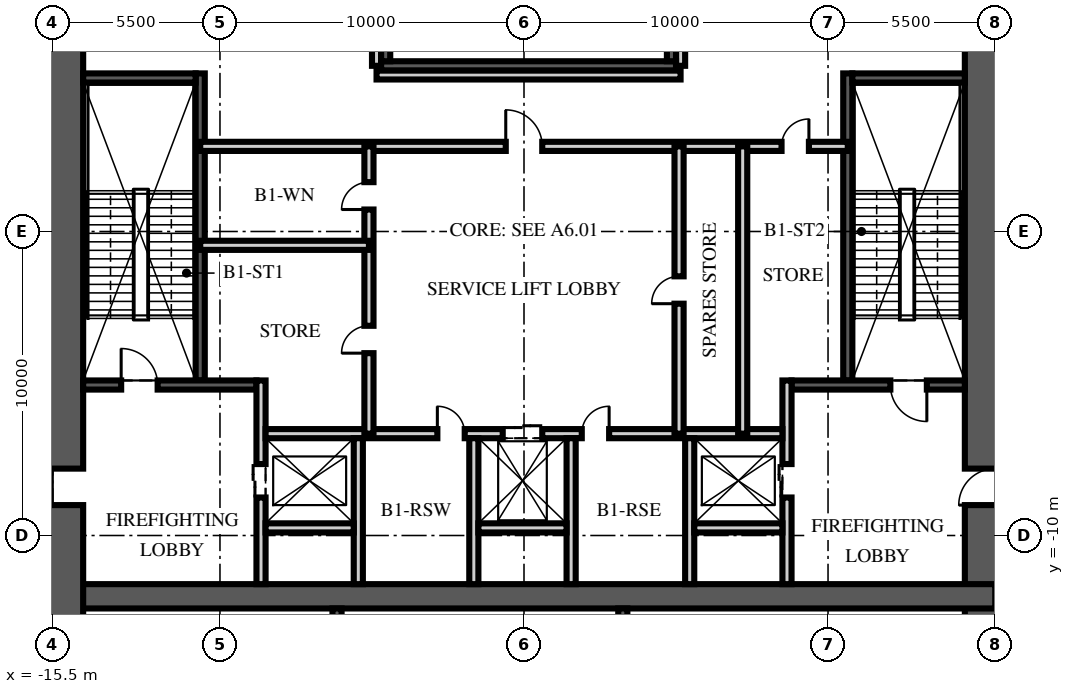
"""IFC4 building model, lengths in metres.
Left out: names, types, materials, properties, quantities, classifications, styles, units other than length and angle.
Written with IfcOpenShell. Run it as: python <this file> out.ifc"""

import sys

from ifc_helpers import new_model, si_unit, direction, frame, frame_2d, origin, place, context, subcontext, project, spatial, rectangle, extrude, element, fill, save


model = new_model("IFC4")
c1 = context("Model", 3, precision=1e-05, world=origin(), true_north=direction((0.0, 1.0)))
c2 = subcontext(c1, "Body", "Model", "MODEL_VIEW")
j1 = project(units=[si_unit("LENGTHUNIT", "METRE"), si_unit("PLANEANGLEUNIT", "RADIAN")], contexts=[c1])
p1 = place(None, origin())
s1 = spatial("IfcSite", under=j1, at=p1, CompositionType="ELEMENT")
p2 = place(p1, origin())
s2 = spatial("IfcBuilding", under=s1, at=p2, CompositionType="ELEMENT")
p3 = place(p2, frame((0.0, 0.0, -5.4)))
s3 = spatial("IfcBuildingStorey", under=s2, at=p3, CompositionType="ELEMENT", Elevation=-5.4)
p4 = place(p3, frame((15.5, -15.5, -0.3), z_axis=(0.0, 0.0, 1.0), x_axis=(0.0, 1.0, 0.0)))
e1 = element("IfcWall", 1, at=p4, inside=s3, PredefinedType="SHEAR", context=c2, shape_type="SweptSolid", body=[
    extrude(rectangle(XDim=31.0, YDim=2.0, at=frame_2d((15.5, 0.0))), origin(), (0.0, 0.0, 1.0), 5.4),
])
p5 = place(p4, frame((6.5, 0.0, 0.3)))
e2 = element("IfcOpeningElement", 2, at=p5, cuts=e1, PredefinedType="OPENING", context=c2, shape_type="SweptSolid", body=[
    extrude(rectangle(XDim=1.2, YDim=2.1, at=frame_2d((0.6, 1.05))), frame((0.0, 1.01, 0.0), z_axis=(0.0, -1.0, 0.0), x_axis=(1.0, 0.0, 0.0)), (0.0, 0.0, 1.0), 2.02),
])
p6 = place(p4, frame((23.0, 0.0, 0.3)))
e3 = element("IfcOpeningElement", 3, at=p6, cuts=e1, PredefinedType="OPENING", context=c2, shape_type="SweptSolid", body=[
    extrude(rectangle(XDim=1.8, YDim=2.1, at=frame_2d((0.9, 1.05))), frame((0.0, 1.01, 0.0), z_axis=(0.0, -1.0, 0.0), x_axis=(1.0, 0.0, 0.0)), (0.0, 0.0, 1.0), 2.02),
])
p7 = place(p3, frame((-15.5, -12.0, -0.3), z_axis=(0.0, 0.0, 1.0), x_axis=(1.0, 0.0, 0.0)))
e4 = element("IfcWall", 4, at=p7, inside=s3, PredefinedType="SHEAR", context=c2, shape_type="SweptSolid", body=[
    extrude(rectangle(XDim=31.0, YDim=0.8, at=frame_2d((15.5, 0.0))), origin(), (0.0, 0.0, 1.0), 5.4),
])
p8 = place(p3, frame((-15.5, -15.5, -0.3), z_axis=(0.0, 0.0, 1.0), x_axis=(0.0, 1.0, 0.0)))
e5 = element("IfcWall", 5, at=p8, inside=s3, PredefinedType="SHEAR", context=c2, shape_type="SweptSolid", body=[
    extrude(rectangle(XDim=31.0, YDim=2.0, at=frame_2d((15.5, 0.0))), origin(), (0.0, 0.0, 1.0), 5.4),
])
p9 = place(p8, frame((6.5, 0.0, 0.3)))
e6 = element("IfcOpeningElement", 6, at=p9, cuts=e5, PredefinedType="OPENING", context=c2, shape_type="SweptSolid", body=[
    extrude(rectangle(XDim=1.2, YDim=2.1, at=frame_2d((0.6, 1.05))), frame((0.0, 1.01, 0.0), z_axis=(0.0, -1.0, 0.0), x_axis=(1.0, 0.0, 0.0)), (0.0, 0.0, 1.0), 2.02),
])
p10 = place(p8, frame((23.0, 0.0, 0.3)))
e7 = element("IfcOpeningElement", 7, at=p10, cuts=e5, PredefinedType="OPENING", context=c2, shape_type="SweptSolid", body=[
    extrude(rectangle(XDim=1.8, YDim=2.1, at=frame_2d((0.9, 1.05))), frame((0.0, 1.01, 0.0), z_axis=(0.0, -1.0, 0.0), x_axis=(1.0, 0.0, 0.0)), (0.0, 0.0, 1.0), 2.02),
])
p11 = place(p3, frame((-10.65, -4.9, 0.0), z_axis=(0.0, 0.0, 1.0), x_axis=(0.0, 1.0, 0.0)))
e8 = element("IfcWall", 8, at=p11, inside=s3, PredefinedType="SOLIDWALL", context=c2, shape_type="SweptSolid", body=[
    extrude(rectangle(XDim=10.1, YDim=0.3, at=frame_2d((5.05, 0.0))), origin(), (0.0, 0.0, 1.0), 5.1),
])
p12 = place(p3, frame((-14.5, -5.05, 0.0), z_axis=(0.0, 0.0, 1.0), x_axis=(1.0, 0.0, 0.0)))
e9 = element("IfcWall", 9, at=p12, inside=s3, PredefinedType="SOLIDWALL", context=c2, shape_type="SweptSolid", body=[
    extrude(rectangle(XDim=5.7, YDim=0.3, at=frame_2d((2.85, 0.0))), origin(), (0.0, 0.0, 1.0), 5.1),
])
p13 = place(p12, frame((1.25, 0.0, 0.0)))
e10 = element("IfcOpeningElement", 10, at=p13, cuts=e9, PredefinedType="OPENING", context=c2, shape_type="SweptSolid", body=[
    extrude(rectangle(XDim=1.2, YDim=2.1, at=frame_2d((0.6, 1.05))), frame((0.0, 0.16, 0.0), z_axis=(0.0, -1.0, 0.0), x_axis=(1.0, 0.0, 0.0)), (0.0, 0.0, 1.0), 0.32),
])
p14 = place(p3, frame((-14.5, 5.05, 0.0), z_axis=(0.0, 0.0, 1.0), x_axis=(1.0, 0.0, 0.0)))
e11 = element("IfcWall", 11, at=p14, inside=s3, PredefinedType="SOLIDWALL", context=c2, shape_type="SweptSolid", body=[
    extrude(rectangle(XDim=3.7, YDim=0.3, at=frame_2d((1.85, 0.0))), origin(), (0.0, 0.0, 1.0), 5.1),
])
p15 = place(p3, frame((-8.65, -11.6, 0.0), z_axis=(0.0, 0.0, 1.0), x_axis=(0.0, 1.0, 0.0)))
e12 = element("IfcWall", 12, at=p15, inside=s3, PredefinedType="PARTITIONING", context=c2, shape_type="SweptSolid", body=[
    extrude(rectangle(XDim=6.7, YDim=0.3, at=frame_2d((3.35, 0.0))), origin(), (0.0, 0.0, 1.0), 4.8),
])
p16 = place(p15, frame((2.85, 0.0, 0.0)))
e13 = element("IfcOpeningElement", 13, at=p16, cuts=e12, PredefinedType="OPENING", context=c2, shape_type="SweptSolid", body=[
    extrude(rectangle(XDim=1.1, YDim=2.1, at=frame_2d((0.55, 1.05))), frame((0.0, 0.16, 0.0), z_axis=(0.0, -1.0, 0.0), x_axis=(1.0, 0.0, 0.0)), (0.0, 0.0, 1.0), 0.32),
])
p17 = place(p3, frame((10.65, -4.9, 0.0), z_axis=(0.0, 0.0, 1.0), x_axis=(0.0, 1.0, 0.0)))
e14 = element("IfcWall", 14, at=p17, inside=s3, PredefinedType="SOLIDWALL", context=c2, shape_type="SweptSolid", body=[
    extrude(rectangle(XDim=10.1, YDim=0.3, at=frame_2d((5.05, 0.0))), origin(), (0.0, 0.0, 1.0), 5.1),
])
p18 = place(p3, frame((14.5, -5.05, 0.0), z_axis=(0.0, 0.0, 1.0), x_axis=(-1.0, 0.0, 0.0)))
e15 = element("IfcWall", 15, at=p18, inside=s3, PredefinedType="SOLIDWALL", context=c2, shape_type="SweptSolid", body=[
    extrude(rectangle(XDim=5.7, YDim=0.3, at=frame_2d((2.85, 0.0))), origin(), (0.0, 0.0, 1.0), 5.1),
])
p19 = place(p18, frame((1.25, 0.0, 0.0)))
e16 = element("IfcOpeningElement", 16, at=p19, cuts=e15, PredefinedType="OPENING", context=c2, shape_type="SweptSolid", body=[
    extrude(rectangle(XDim=1.2, YDim=2.1, at=frame_2d((0.6, 1.05))), frame((0.0, 0.16, 0.0), z_axis=(0.0, -1.0, 0.0), x_axis=(1.0, 0.0, 0.0)), (0.0, 0.0, 1.0), 0.32),
])
p20 = place(p3, frame((14.5, 5.05, 0.0), z_axis=(0.0, 0.0, 1.0), x_axis=(-1.0, 0.0, 0.0)))
e17 = element("IfcWall", 17, at=p20, inside=s3, PredefinedType="SOLIDWALL", context=c2, shape_type="SweptSolid", body=[
    extrude(rectangle(XDim=3.7, YDim=0.3, at=frame_2d((1.85, 0.0))), origin(), (0.0, 0.0, 1.0), 5.1),
])
p21 = place(p3, frame((8.65, -11.6, 0.0), z_axis=(0.0, 0.0, 1.0), x_axis=(0.0, 1.0, 0.0)))
e18 = element("IfcWall", 18, at=p21, inside=s3, PredefinedType="PARTITIONING", context=c2, shape_type="SweptSolid", body=[
    extrude(rectangle(XDim=6.7, YDim=0.3, at=frame_2d((3.35, 0.0))), origin(), (0.0, 0.0, 1.0), 4.8),
])
p22 = place(p21, frame((2.85, 0.0, 0.0)))
e19 = element("IfcOpeningElement", 19, at=p22, cuts=e18, PredefinedType="OPENING", context=c2, shape_type="SweptSolid", body=[
    extrude(rectangle(XDim=1.1, YDim=2.1, at=frame_2d((0.55, 1.05))), frame((0.0, 0.16, 0.0), z_axis=(0.0, -1.0, 0.0), x_axis=(1.0, 0.0, 0.0)), (0.0, 0.0, 1.0), 0.32),
])
p23 = place(p3, frame((-8.5, -6.65, 0.0), z_axis=(0.0, 0.0, 1.0), x_axis=(1.0, 0.0, 0.0)))
e20 = element("IfcWall", 20, at=p23, inside=s3, PredefinedType="PARTITIONING", context=c2, shape_type="SweptSolid", body=[
    extrude(rectangle(XDim=17.0, YDim=0.3, at=frame_2d((8.5, 0.0))), origin(), (0.0, 0.0, 1.0), 4.8),
])
p24 = place(p23, frame((7.8, 0.0, 0.0)))
e21 = element("IfcOpeningElement", 21, at=p24, cuts=e20, PredefinedType="OPENING", context=c2, shape_type="SweptSolid", body=[
    extrude(rectangle(XDim=1.3, YDim=2.4, at=frame_2d((0.65, 1.2))), frame((0.0, 0.16, 0.0), z_axis=(0.0, -1.0, 0.0), x_axis=(1.0, 0.0, 0.0)), (0.0, 0.0, 1.0), 0.32),
])
p25 = place(p23, frame((5.65, 0.0, 0.0)))
e22 = element("IfcOpeningElement", 22, at=p25, cuts=e20, PredefinedType="OPENING", context=c2, shape_type="SweptSolid", body=[
    extrude(rectangle(XDim=0.9, YDim=2.1, at=frame_2d((0.45, 1.05))), frame((0.0, 0.16, 0.0), z_axis=(0.0, -1.0, 0.0), x_axis=(1.0, 0.0, 0.0)), (0.0, 0.0, 1.0), 0.32),
])
p26 = place(p23, frame((10.4, 0.0, 0.0)))
e23 = element("IfcOpeningElement", 23, at=p26, cuts=e20, PredefinedType="OPENING", context=c2, shape_type="SweptSolid", body=[
    extrude(rectangle(XDim=0.9, YDim=2.1, at=frame_2d((0.45, 1.05))), frame((0.0, 0.16, 0.0), z_axis=(0.0, -1.0, 0.0), x_axis=(1.0, 0.0, 0.0)), (0.0, 0.0, 1.0), 0.32),
])
for number, where, z_axis, x_axis in (
    (24, (-5.45, -11.6, 0.0), (0.0, 0.0, 1.0), (0.0, 1.0, 0.0)),
    (25, (-1.65, -11.6, 0.0), (0.0, 0.0, 1.0), (0.0, 1.0, 0.0)),
    (26, (1.55, -11.6, 0.0), (0.0, 0.0, 1.0), (0.0, 1.0, 0.0)),
    (27, (5.45, -11.6, 0.0), (0.0, 0.0, 1.0), (0.0, 1.0, 0.0)),
):
    element("IfcWall", number, at=place(p3, frame(where, z_axis=z_axis, x_axis=x_axis)), inside=s3, PredefinedType="PARTITIONING", context=c2, shape_type="SweptSolid", body=[
        extrude(rectangle(XDim=4.8, YDim=0.3, at=frame_2d((2.4, 0.0))), origin(), (0.0, 0.0, 1.0), 4.8),
    ])
for number, where, z_axis, x_axis in (
    (28, (-8.5, -9.75, 0.0), (0.0, 0.0, 1.0), (1.0, 0.0, 0.0)),
    (29, (-1.5, -9.75, 0.0), (0.0, 0.0, 1.0), (1.0, 0.0, 0.0)),
    (30, (5.6, -9.75, 0.0), (0.0, 0.0, 1.0), (1.0, 0.0, 0.0)),
):
    element("IfcWall", number, at=place(p3, frame(where, z_axis=z_axis, x_axis=x_axis)), inside=s3, PredefinedType="PARTITIONING", context=c2, shape_type="SweptSolid", body=[
        extrude(rectangle(XDim=2.9, YDim=0.3, at=frame_2d((1.45, 0.0))), origin(), (0.0, 0.0, 1.0), 4.8),
    ])
p27 = place(p3, frame((-10.65, 2.8, 0.0), z_axis=(0.0, 0.0, 1.0), x_axis=(1.0, 0.0, 0.0)))
e31 = element("IfcWall", 31, at=p27, inside=s3, PredefinedType="PARTITIONING", context=c2, shape_type="SweptSolid", body=[
    extrude(rectangle(XDim=21.3, YDim=0.3, at=frame_2d((10.65, 0.0))), origin(), (0.0, 0.0, 1.0), 4.8),
])
p28 = place(p27, frame((10.05, 0.0, 0.0)))
e32 = element("IfcOpeningElement", 32, at=p28, cuts=e31, PredefinedType="OPENING", context=c2, shape_type="SweptSolid", body=[
    extrude(rectangle(XDim=1.2, YDim=2.1, at=frame_2d((0.6, 1.05))), frame((0.0, 0.16, 0.0), z_axis=(0.0, -1.0, 0.0), x_axis=(1.0, 0.0, 0.0)), (0.0, 0.0, 1.0), 0.32),
])
p29 = place(p27, frame((19.121, 0.0, 0.0)))
e33 = element("IfcOpeningElement", 33, at=p29, cuts=e31, PredefinedType="OPENING", context=c2, shape_type="SweptSolid", body=[
    extrude(rectangle(XDim=0.9, YDim=2.1, at=frame_2d((0.45, 1.05))), frame((0.0, 0.16, 0.0), z_axis=(0.0, -1.0, 0.0), x_axis=(1.0, 0.0, 0.0)), (0.0, 0.0, 1.0), 0.32),
])
p30 = place(p3, frame((-5.1, -6.65, 0.0), z_axis=(0.0, 0.0, 1.0), x_axis=(0.0, 1.0, 0.0)))
e34 = element("IfcWall", 34, at=p30, inside=s3, PredefinedType="PARTITIONING", context=c2, shape_type="SweptSolid", body=[
    extrude(rectangle(XDim=9.45, YDim=0.3, at=frame_2d((4.725, 0.0))), origin(), (0.0, 0.0, 1.0), 4.8),
])
p31 = place(p30, frame((2.648, 0.0, 0.0)))
e35 = element("IfcOpeningElement", 35, at=p31, cuts=e34, PredefinedType="OPENING", context=c2, shape_type="SweptSolid", body=[
    extrude(rectangle(XDim=0.9, YDim=2.1, at=frame_2d((0.45, 1.05))), frame((0.0, 0.16, 0.0), z_axis=(0.0, -1.0, 0.0), x_axis=(1.0, 0.0, 0.0)), (0.0, 0.0, 1.0), 0.32),
])
p32 = place(p30, frame((7.373, 0.0, 0.0)))
e36 = element("IfcOpeningElement", 36, at=p32, cuts=e34, PredefinedType="OPENING", context=c2, shape_type="SweptSolid", body=[
    extrude(rectangle(XDim=0.9, YDim=2.1, at=frame_2d((0.45, 1.05))), frame((0.0, 0.16, 0.0), z_axis=(0.0, -1.0, 0.0), x_axis=(1.0, 0.0, 0.0)), (0.0, 0.0, 1.0), 0.32),
])
p33 = place(p3, frame((5.1, -6.65, 0.0), z_axis=(0.0, 0.0, 1.0), x_axis=(0.0, 1.0, 0.0)))
e37 = element("IfcWall", 37, at=p33, inside=s3, PredefinedType="PARTITIONING", context=c2, shape_type="SweptSolid", body=[
    extrude(rectangle(XDim=9.45, YDim=0.3, at=frame_2d((4.725, 0.0))), origin(), (0.0, 0.0, 1.0), 4.8),
])
p34 = place(p33, frame((4.275, 0.0, 0.0)))
e38 = element("IfcOpeningElement", 38, at=p34, cuts=e37, PredefinedType="OPENING", context=c2, shape_type="SweptSolid", body=[
    extrude(rectangle(XDim=0.9, YDim=2.1, at=frame_2d((0.45, 1.05))), frame((0.0, 0.16, 0.0), z_axis=(0.0, -1.0, 0.0), x_axis=(1.0, 0.0, 0.0)), (0.0, 0.0, 1.0), 0.32),
])
p35 = place(p3, frame((-10.65, -0.455, 0.0), z_axis=(0.0, 0.0, 1.0), x_axis=(1.0, 0.0, 0.0)))
e39 = element("IfcWall", 39, at=p35, inside=s3, PredefinedType="PARTITIONING", context=c2, shape_type="SweptSolid", body=[
    extrude(rectangle(XDim=5.55, YDim=0.3, at=frame_2d((2.775, 0.0))), origin(), (0.0, 0.0, 1.0), 4.8),
])
p36 = place(p3, frame((7.193, -6.65, 0.0), z_axis=(0.0, 0.0, 1.0), x_axis=(0.0, 1.0, 0.0)))
e40 = element("IfcWall", 40, at=p36, inside=s3, PredefinedType="PARTITIONING", context=c2, shape_type="SweptSolid", body=[
    extrude(rectangle(XDim=9.45, YDim=0.3, at=frame_2d((4.725, 0.0))), origin(), (0.0, 0.0, 1.0), 4.8),
])
p37 = place(p3, frame((-4.85, 5.15, 0.0), z_axis=(0.0, 0.0, 1.0), x_axis=(1.0, 0.0, 0.0)))
e41 = element("IfcWall", 41, at=p37, inside=s3, PredefinedType="PARTITIONING", context=c2, shape_type="SweptSolid", body=[
    extrude(rectangle(XDim=10.0, YDim=0.3, at=frame_2d((5.0, 0.0))), origin(), (0.0, 0.0, 1.0), 4.8),
])
p38 = place(p3, frame((-4.85, 5.45, 0.0), z_axis=(0.0, 0.0, 1.0), x_axis=(0.0, 1.0, 0.0)))
e42 = element("IfcWall", 42, at=p38, inside=s3, PredefinedType="PARTITIONING", context=c2, shape_type="SweptSolid", body=[
    extrude(rectangle(XDim=6.15, YDim=0.3, at=frame_2d((3.075, 0.0))), origin(), (0.0, 0.0, 1.0), 4.8),
])
p39 = place(p3, frame((5.15, 5.45, 0.0), z_axis=(0.0, 0.0, 1.0), x_axis=(0.0, 1.0, 0.0)))
e43 = element("IfcWall", 43, at=p39, inside=s3, PredefinedType="PARTITIONING", context=c2, shape_type="SweptSolid", body=[
    extrude(rectangle(XDim=6.15, YDim=0.3, at=frame_2d((3.075, 0.0))), origin(), (0.0, 0.0, 1.0), 4.8),
])
p40 = place(p39, frame((1.1, 0.0, 0.0)))
e44 = element("IfcOpeningElement", 44, at=p40, cuts=e43, PredefinedType="OPENING", context=c2, shape_type="SweptSolid", body=[
    extrude(rectangle(XDim=0.9, YDim=2.1, at=frame_2d((0.45, 1.05))), frame((0.0, 0.16, 0.0), z_axis=(0.0, -1.0, 0.0), x_axis=(1.0, 0.0, 0.0)), (0.0, 0.0, 1.0), 0.32),
])
p41 = place(p3, frame((-4.7, 5.45, 3.3), z_axis=(0.0, 0.0, 1.0), x_axis=(1.0, 0.0, 0.0)))
e45 = element("IfcWall", 45, at=p41, inside=s3, PredefinedType="SOLIDWALL", context=c2, shape_type="SweptSolid", body=[
    extrude(rectangle(XDim=9.7, YDim=0.3, at=frame_2d((4.85, 0.0))), origin(), (0.0, 0.0, 1.0), 1.8),
])
for number, where, z_axis, x_axis in (
    (46, (-4.55, 5.6, 3.3), (0.0, 0.0, 1.0), (0.0, 1.0, 0.0)),
    (47, (4.85, 5.6, 3.3), (0.0, 0.0, 1.0), (0.0, 1.0, 0.0)),
):
    element("IfcWall", number, at=place(p3, frame(where, z_axis=z_axis, x_axis=x_axis)), inside=s3, PredefinedType="SOLIDWALL", context=c2, shape_type="SweptSolid", body=[
        extrude(rectangle(XDim=2.8, YDim=0.3, at=frame_2d((1.4, 0.0))), origin(), (0.0, 0.0, 1.0), 1.8),
    ])
for number, where, z_axis, x_axis in (
    (48, (-6.15, -14.5, 3.3), (0.0, 0.0, 1.0), (0.0, 1.0, 0.0)),
    (49, (3.25, -14.5, 3.3), (0.0, 0.0, 1.0), (0.0, 1.0, 0.0)),
):
    element("IfcWall", number, at=place(p3, frame(where, z_axis=z_axis, x_axis=x_axis)), inside=s3, PredefinedType="SOLIDWALL", context=c2, shape_type="SweptSolid", body=[
        extrude(rectangle(XDim=2.1, YDim=0.3, at=frame_2d((1.05, 0.0))), origin(), (0.0, 0.0, 1.0), 1.8),
    ])
p42 = place(p13, origin())
e50 = element("IfcDoor", 50, at=p42, inside=s3, OperationType="SINGLE_SWING_LEFT", PredefinedType="DOOR", context=c2, shape_type="SweptSolid", body=[
    extrude(rectangle(XDim=1.2, YDim=2.1, at=frame_2d((0.6, 1.05))), frame((0.0, 0.025, 0.0), z_axis=(0.0, -1.0, 0.0), x_axis=(1.0, 0.0, 0.0)), (0.0, 0.0, 1.0), 0.05),
])
fill(e10, e50)
p43 = place(p9, origin())
e51 = element("IfcDoor", 51, at=p43, inside=s3, OperationType="SINGLE_SWING_LEFT", PredefinedType="DOOR", context=c2, shape_type="SweptSolid", body=[
    extrude(rectangle(XDim=1.2, YDim=2.1, at=frame_2d((0.6, 1.05))), frame((0.0, 0.025, 0.0), z_axis=(0.0, -1.0, 0.0), x_axis=(1.0, 0.0, 0.0)), (0.0, 0.0, 1.0), 0.05),
])
fill(e6, e51)
p44 = place(p19, origin())
e52 = element("IfcDoor", 52, at=p44, inside=s3, OperationType="SINGLE_SWING_LEFT", PredefinedType="DOOR", context=c2, shape_type="SweptSolid", body=[
    extrude(rectangle(XDim=1.2, YDim=2.1, at=frame_2d((0.6, 1.05))), frame((0.0, 0.025, 0.0), z_axis=(0.0, -1.0, 0.0), x_axis=(1.0, 0.0, 0.0)), (0.0, 0.0, 1.0), 0.05),
])
fill(e16, e52)
p45 = place(p5, origin())
e53 = element("IfcDoor", 53, at=p45, inside=s3, OperationType="SINGLE_SWING_LEFT", PredefinedType="DOOR", context=c2, shape_type="SweptSolid", body=[
    extrude(rectangle(XDim=1.2, YDim=2.1, at=frame_2d((0.6, 1.05))), frame((0.0, 0.025, 0.0), z_axis=(0.0, -1.0, 0.0), x_axis=(1.0, 0.0, 0.0)), (0.0, 0.0, 1.0), 0.05),
])
fill(e2, e53)
p46 = place(p16, origin())
e54 = element("IfcDoor", 54, at=p46, inside=s3, OperationType="DOUBLE_DOOR_SLIDING", PredefinedType="DOOR", context=c2, shape_type="SweptSolid", body=[
    extrude(rectangle(XDim=1.1, YDim=2.1, at=frame_2d((0.55, 1.05))), frame((0.0, 0.025, 0.0), z_axis=(0.0, -1.0, 0.0), x_axis=(1.0, 0.0, 0.0)), (0.0, 0.0, 1.0), 0.05),
])
fill(e13, e54)
p47 = place(p22, origin())
e55 = element("IfcDoor", 55, at=p47, inside=s3, OperationType="DOUBLE_DOOR_SLIDING", PredefinedType="DOOR", context=c2, shape_type="SweptSolid", body=[
    extrude(rectangle(XDim=1.1, YDim=2.1, at=frame_2d((0.55, 1.05))), frame((0.0, 0.025, 0.0), z_axis=(0.0, -1.0, 0.0), x_axis=(1.0, 0.0, 0.0)), (0.0, 0.0, 1.0), 0.05),
])
fill(e19, e55)
p48 = place(p24, origin())
e56 = element("IfcDoor", 56, at=p48, inside=s3, OperationType="DOUBLE_DOOR_SLIDING", PredefinedType="DOOR", context=c2, shape_type="SweptSolid", body=[
    extrude(rectangle(XDim=1.3, YDim=2.4, at=frame_2d((0.65, 1.2))), frame((0.0, 0.025, 0.0), z_axis=(0.0, -1.0, 0.0), x_axis=(1.0, 0.0, 0.0)), (0.0, 0.0, 1.0), 0.05),
])
fill(e21, e56)
p49 = place(p28, origin())
e57 = element("IfcDoor", 57, at=p49, inside=s3, OperationType="SINGLE_SWING_LEFT", PredefinedType="DOOR", context=c2, shape_type="SweptSolid", body=[
    extrude(rectangle(XDim=1.2, YDim=2.1, at=frame_2d((0.6, 1.05))), frame((0.0, 0.025, 0.0), z_axis=(0.0, -1.0, 0.0), x_axis=(1.0, 0.0, 0.0)), (0.0, 0.0, 1.0), 0.05),
])
fill(e32, e57)
p50 = place(p25, origin())
e58 = element("IfcDoor", 58, at=p50, inside=s3, OperationType="SINGLE_SWING_LEFT", PredefinedType="DOOR", context=c2, shape_type="SweptSolid", body=[
    extrude(rectangle(XDim=0.9, YDim=2.1, at=frame_2d((0.45, 1.05))), frame((0.0, 0.025, 0.0), z_axis=(0.0, -1.0, 0.0), x_axis=(1.0, 0.0, 0.0)), (0.0, 0.0, 1.0), 0.05),
])
fill(e22, e58)
p51 = place(p26, origin())
e59 = element("IfcDoor", 59, at=p51, inside=s3, OperationType="SINGLE_SWING_RIGHT", PredefinedType="DOOR", context=c2, shape_type="SweptSolid", body=[
    extrude(rectangle(XDim=0.9, YDim=2.1, at=frame_2d((0.45, 1.05))), frame((0.0, 0.025, 0.0), z_axis=(0.0, -1.0, 0.0), x_axis=(1.0, 0.0, 0.0)), (0.0, 0.0, 1.0), 0.05),
])
fill(e23, e59)
p52 = place(p31, origin())
e60 = element("IfcDoor", 60, at=p52, inside=s3, OperationType="SINGLE_SWING_LEFT", PredefinedType="DOOR", context=c2, shape_type="SweptSolid", body=[
    extrude(rectangle(XDim=0.9, YDim=2.1, at=frame_2d((0.45, 1.05))), frame((0.0, 0.025, 0.0), z_axis=(0.0, -1.0, 0.0), x_axis=(1.0, 0.0, 0.0)), (0.0, 0.0, 1.0), 0.05),
])
fill(e35, e60)
p53 = place(p32, origin())
e61 = element("IfcDoor", 61, at=p53, inside=s3, OperationType="SINGLE_SWING_LEFT", PredefinedType="DOOR", context=c2, shape_type="SweptSolid", body=[
    extrude(rectangle(XDim=0.9, YDim=2.1, at=frame_2d((0.45, 1.05))), frame((0.0, 0.025, 0.0), z_axis=(0.0, -1.0, 0.0), x_axis=(1.0, 0.0, 0.0)), (0.0, 0.0, 1.0), 0.05),
])
fill(e36, e61)
p54 = place(p34, origin())
e62 = element("IfcDoor", 62, at=p54, inside=s3, OperationType="SINGLE_SWING_LEFT", PredefinedType="DOOR", context=c2, shape_type="SweptSolid", body=[
    extrude(rectangle(XDim=0.9, YDim=2.1, at=frame_2d((0.45, 1.05))), frame((0.0, 0.025, 0.0), z_axis=(0.0, -1.0, 0.0), x_axis=(1.0, 0.0, 0.0)), (0.0, 0.0, 1.0), 0.05),
])
fill(e38, e62)
p55 = place(p29, origin())
e63 = element("IfcDoor", 63, at=p55, inside=s3, OperationType="SINGLE_SWING_RIGHT", PredefinedType="DOOR", context=c2, shape_type="SweptSolid", body=[
    extrude(rectangle(XDim=0.9, YDim=2.1, at=frame_2d((0.45, 1.05))), frame((0.0, 0.025, 0.0), z_axis=(0.0, -1.0, 0.0), x_axis=(1.0, 0.0, 0.0)), (0.0, 0.0, 1.0), 0.05),
])
fill(e33, e63)
save(model, sys.argv[1])
